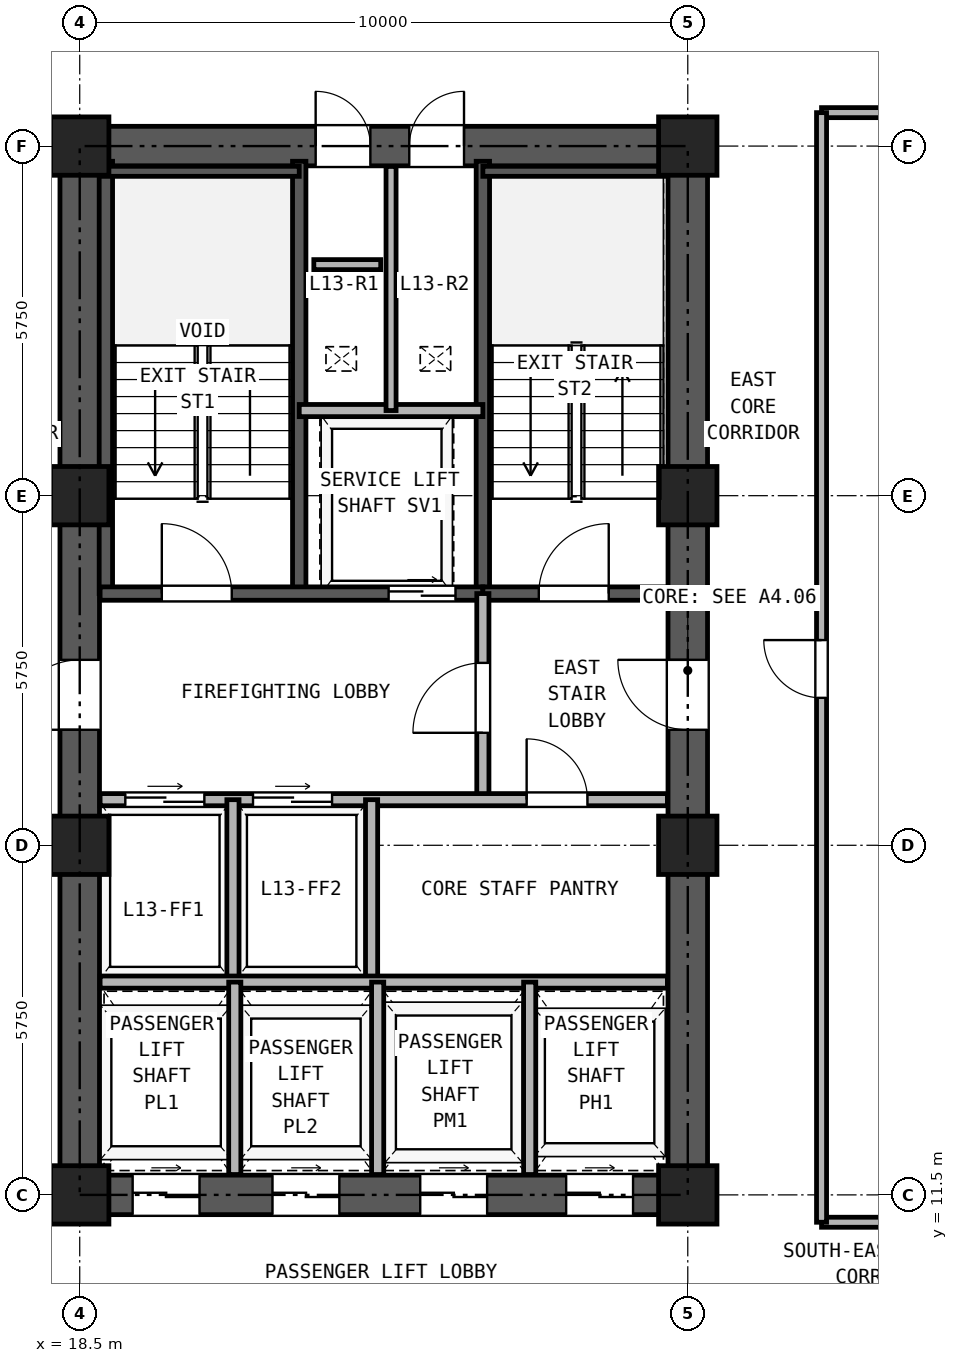
"""IFC4 building model, lengths in metres.
Left out: names, types, materials, properties, quantities, classifications, styles, units other than length and angle.
Written with IfcOpenShell. Run it as: python <this file> out.ifc"""

import sys

from ifc_helpers import new_model, si_unit, direction, frame, frame_2d, origin, origin_2d, place, context, subcontext, project, spatial, rectangle, hollow_rectangle, extrude, source, transform, mapped, element, fill, save


model = new_model("IFC4")
c1 = context("Model", 3, precision=1e-05, world=origin(), true_north=direction((0.0, 1.0)))
c2 = subcontext(c1, "Body", "Model", "MODEL_VIEW")
j1 = project(units=[si_unit("LENGTHUNIT", "METRE"), si_unit("PLANEANGLEUNIT", "RADIAN")], contexts=[c1])
p1 = place(None, origin())
s1 = spatial("IfcSite", under=j1, at=p1, CompositionType="ELEMENT")
p2 = place(p1, origin())
s2 = spatial("IfcBuilding", under=s1, at=p2, CompositionType="ELEMENT")
p3 = place(p2, frame((0.0, 0.0, 51.3)))
s3 = spatial("IfcBuildingStorey", under=s2, at=p3, CompositionType="ELEMENT", Elevation=51.3)
m1 = source(origin(), c2, "Body", "SweptSolid", [
    extrude(hollow_rectangle(XDim=0.96, YDim=0.96, WallThickness=0.06, at=origin_2d()), origin(), (0.0, 0.0, 1.0), 3.32),
])
for number, where, z_axis, x_axis in (
    (1, (18.5, 11.5, 0.0), (0.0, 0.0, 1.0), (1.0, 0.0, 0.0)),
    (2, (18.5, 17.25, 0.0), (0.0, 0.0, 1.0), (1.0, 0.0, 0.0)),
    (3, (18.5, 23.0, 0.0), (0.0, 0.0, 1.0), (1.0, 0.0, 0.0)),
    (4, (18.5, 28.75, 0.0), (0.0, 0.0, 1.0), (1.0, 0.0, 0.0)),
    (5, (28.5, 11.5, 0.0), (0.0, 0.0, 1.0), (1.0, 0.0, 0.0)),
    (6, (28.5, 17.25, 0.0), (0.0, 0.0, 1.0), (1.0, 0.0, 0.0)),
    (7, (28.5, 23.0, 0.0), (0.0, 0.0, 1.0), (1.0, 0.0, 0.0)),
    (8, (28.5, 28.75, 0.0), (0.0, 0.0, 1.0), (1.0, 0.0, 0.0)),
):
    element("IfcColumn", number, at=place(p3, frame(where, z_axis=z_axis, x_axis=x_axis)), inside=s3, PredefinedType="COLUMN", context=c2, shape_type="MappedRepresentation", body=[
        mapped(m1, transform((0.0, 0.0, 0.0), x_axis=(1.0, 0.0, 0.0), y_axis=(0.0, 1.0, 0.0), z_axis=(0.0, 0.0, 1.0), scale=1.0)),
    ])
p4 = place(p3, frame((18.175, 11.5, 0.0), z_axis=(0.0, 0.0, 1.0), x_axis=(1.0, 0.0, 0.0)))
e9 = element("IfcWall", 9, at=p4, inside=s3, PredefinedType="SHEAR", context=c2, shape_type="SweptSolid", body=[
    extrude(rectangle(XDim=10.65, YDim=0.65, at=frame_2d((5.325, 0.0))), origin(), (0.0, 0.0, 1.0), 3.32),
])
p5 = place(p4, frame((1.195, 0.0, 0.0)))
e10 = element("IfcOpeningElement", 10, at=p5, cuts=e9, PredefinedType="OPENING", context=c2, shape_type="SweptSolid", body=[
    extrude(rectangle(XDim=1.1, YDim=2.25, at=frame_2d((0.55, 1.125))), frame((0.0, 0.335, 0.0), z_axis=(0.0, -1.0, 0.0), x_axis=(1.0, 0.0, 0.0)), (0.0, 0.0, 1.0), 0.67),
])
p6 = place(p4, frame((3.495, 0.0, 0.0)))
e11 = element("IfcOpeningElement", 11, at=p6, cuts=e9, PredefinedType="OPENING", context=c2, shape_type="SweptSolid", body=[
    extrude(rectangle(XDim=1.1, YDim=2.25, at=frame_2d((0.55, 1.125))), frame((0.0, 0.335, 0.0), z_axis=(0.0, -1.0, 0.0), x_axis=(1.0, 0.0, 0.0)), (0.0, 0.0, 1.0), 0.67),
])
p7 = place(p4, frame((5.925, 0.0, 0.0)))
e12 = element("IfcOpeningElement", 12, at=p7, cuts=e9, PredefinedType="OPENING", context=c2, shape_type="SweptSolid", body=[
    extrude(rectangle(XDim=1.1, YDim=2.25, at=frame_2d((0.55, 1.125))), frame((0.0, 0.335, 0.0), z_axis=(0.0, -1.0, 0.0), x_axis=(1.0, 0.0, 0.0)), (0.0, 0.0, 1.0), 0.67),
])
p8 = place(p4, frame((8.325, 0.0, 0.0)))
e13 = element("IfcOpeningElement", 13, at=p8, cuts=e9, PredefinedType="OPENING", context=c2, shape_type="SweptSolid", body=[
    extrude(rectangle(XDim=1.1, YDim=2.25, at=frame_2d((0.55, 1.125))), frame((0.0, 0.335, 0.0), z_axis=(0.0, -1.0, 0.0), x_axis=(1.0, 0.0, 0.0)), (0.0, 0.0, 1.0), 0.67),
])
p9 = place(p3, frame((18.175, 28.75, 0.0), z_axis=(0.0, 0.0, 1.0), x_axis=(1.0, 0.0, 0.0)))
e14 = element("IfcWall", 14, at=p9, inside=s3, PredefinedType="SHEAR", context=c2, shape_type="SweptSolid", body=[
    extrude(rectangle(XDim=10.65, YDim=0.65, at=frame_2d((5.325, 0.0))), origin(), (0.0, 0.0, 1.0), 3.32),
])
p10 = place(p9, frame((4.205, 0.0, 0.0)))
e15 = element("IfcOpeningElement", 15, at=p10, cuts=e14, PredefinedType="OPENING", context=c2, shape_type="SweptSolid", body=[
    extrude(rectangle(XDim=0.9, YDim=2.05, at=frame_2d((0.45, 1.025))), frame((0.0, 0.335, 0.0), z_axis=(0.0, -1.0, 0.0), x_axis=(1.0, 0.0, 0.0)), (0.0, 0.0, 1.0), 0.67),
])
p11 = place(p9, frame((5.745, 0.0, 0.0)))
e16 = element("IfcOpeningElement", 16, at=p11, cuts=e14, PredefinedType="OPENING", context=c2, shape_type="SweptSolid", body=[
    extrude(rectangle(XDim=0.9, YDim=2.05, at=frame_2d((0.45, 1.025))), frame((0.0, 0.335, 0.0), z_axis=(0.0, -1.0, 0.0), x_axis=(1.0, 0.0, 0.0)), (0.0, 0.0, 1.0), 0.67),
])
p12 = place(p3, frame((18.5, 11.825, 0.0), z_axis=(0.0, 0.0, 1.0), x_axis=(0.0, 1.0, 0.0)))
e17 = element("IfcWall", 17, at=p12, inside=s3, PredefinedType="SHEAR", context=c2, shape_type="SweptSolid", body=[
    extrude(rectangle(XDim=16.6, YDim=0.65, at=frame_2d((8.3, 0.0))), origin(), (0.0, 0.0, 1.0), 3.32),
])
p13 = place(p12, frame((7.325, 0.0, 0.0)))
e18 = element("IfcOpeningElement", 18, at=p13, cuts=e17, PredefinedType="OPENING", context=c2, shape_type="SweptSolid", body=[
    extrude(rectangle(XDim=1.15, YDim=2.2, at=frame_2d((0.575, 1.1))), frame((0.0, 0.335, 0.0), z_axis=(0.0, -1.0, 0.0), x_axis=(1.0, 0.0, 0.0)), (0.0, 0.0, 1.0), 0.67),
])
p14 = place(p3, frame((28.5, 11.825, 0.0), z_axis=(0.0, 0.0, 1.0), x_axis=(0.0, 1.0, 0.0)))
e19 = element("IfcWall", 19, at=p14, inside=s3, PredefinedType="SHEAR", context=c2, shape_type="SweptSolid", body=[
    extrude(rectangle(XDim=16.6, YDim=0.65, at=frame_2d((8.3, 0.0))), origin(), (0.0, 0.0, 1.0), 3.32),
])
p15 = place(p14, frame((7.325, 0.0, 0.0)))
e20 = element("IfcOpeningElement", 20, at=p15, cuts=e19, PredefinedType="OPENING", context=c2, shape_type="SweptSolid", body=[
    extrude(rectangle(XDim=1.15, YDim=2.2, at=frame_2d((0.575, 1.1))), frame((0.0, 0.335, 0.0), z_axis=(0.0, -1.0, 0.0), x_axis=(1.0, 0.0, 0.0)), (0.0, 0.0, 1.0), 0.67),
])
for number, where, z_axis, x_axis in (
    (21, (18.93, 21.39, 0.0), (0.0, 0.0, 1.0), (0.0, 1.0, 0.0)),
    (22, (22.11, 21.39, 0.0), (0.0, 0.0, 1.0), (0.0, 1.0, 0.0)),
    (23, (25.13, 21.39, 0.0), (0.0, 0.0, 1.0), (0.0, 1.0, 0.0)),
):
    element("IfcWall", number, at=place(p3, frame(where, z_axis=z_axis, x_axis=x_axis)), inside=s3, PredefinedType="SOLIDWALL", context=c2, shape_type="SweptSolid", body=[
        extrude(rectangle(XDim=7.11, YDim=0.22, at=frame_2d((3.555, 0.0))), origin(), (0.0, 0.0, 1.0), 3.32),
    ])
p16 = place(p3, frame((18.835, 28.335, 0.0), z_axis=(0.0, 0.0, 1.0), x_axis=(1.0, 0.0, 0.0)))
e24 = element("IfcWall", 24, at=p16, inside=s3, PredefinedType="PARTITIONING", context=c2, shape_type="SweptSolid", body=[
    extrude(rectangle(XDim=3.275, YDim=0.165, at=frame_2d((1.638, 0.0))), origin(), (0.0, 0.0, 1.0), 3.32),
])
p17 = place(p3, frame((25.13, 28.335, 0.0), z_axis=(0.0, 0.0, 1.0), x_axis=(1.0, 0.0, 0.0)))
e25 = element("IfcWall", 25, at=p17, inside=s3, PredefinedType="PARTITIONING", context=c2, shape_type="SweptSolid", body=[
    extrude(rectangle(XDim=3.035, YDim=0.165, at=frame_2d((1.518, 0.0))), origin(), (0.0, 0.0, 1.0), 3.32),
])
p18 = place(p3, frame((18.835, 21.39, 0.0), z_axis=(0.0, 0.0, 1.0), x_axis=(1.0, 0.0, 0.0)))
e26 = element("IfcWall", 26, at=p18, inside=s3, PredefinedType="SOLIDWALL", context=c2, shape_type="SweptSolid", body=[
    extrude(rectangle(XDim=6.295, YDim=0.22, at=frame_2d((3.147, 0.0))), origin(), (0.0, 0.0, 1.0), 3.32),
])
p19 = place(p18, frame((1.015, 0.0, 0.0)))
e27 = element("IfcOpeningElement", 27, at=p19, cuts=e26, PredefinedType="OPENING", context=c2, shape_type="SweptSolid", body=[
    extrude(rectangle(XDim=1.15, YDim=2.2, at=frame_2d((0.575, 1.1))), frame((0.0, 0.12, 0.0), z_axis=(0.0, -1.0, 0.0), x_axis=(1.0, 0.0, 0.0)), (0.0, 0.0, 1.0), 0.24),
])
p20 = place(p18, frame((4.745, 0.0, 0.0)))
e28 = element("IfcOpeningElement", 28, at=p20, cuts=e26, PredefinedType="OPENING", context=c2, shape_type="SweptSolid", body=[
    extrude(rectangle(XDim=1.1, YDim=2.25, at=frame_2d((0.55, 1.125))), frame((0.0, 0.12, 0.0), z_axis=(0.0, -1.0, 0.0), x_axis=(1.0, 0.0, 0.0)), (0.0, 0.0, 1.0), 0.24),
])
p21 = place(p3, frame((25.13, 21.39, 0.0), z_axis=(0.0, 0.0, 1.0), x_axis=(1.0, 0.0, 0.0)))
e29 = element("IfcWall", 29, at=p21, inside=s3, PredefinedType="SOLIDWALL", context=c2, shape_type="SweptSolid", body=[
    extrude(rectangle(XDim=3.035, YDim=0.22, at=frame_2d((1.518, 0.0))), origin(), (0.0, 0.0, 1.0), 3.32),
])
p22 = place(p21, frame((0.92, 0.0, 0.0)))
e30 = element("IfcOpeningElement", 30, at=p22, cuts=e29, PredefinedType="OPENING", context=c2, shape_type="SweptSolid", body=[
    extrude(rectangle(XDim=1.15, YDim=2.2, at=frame_2d((0.575, 1.1))), frame((0.0, 0.12, 0.0), z_axis=(0.0, -1.0, 0.0), x_axis=(1.0, 0.0, 0.0)), (0.0, 0.0, 1.0), 0.24),
])
p23 = place(p3, frame((22.11, 24.4, 0.0), z_axis=(0.0, 0.0, 1.0), x_axis=(1.0, 0.0, 0.0)))
e31 = element("IfcWall", 31, at=p23, inside=s3, PredefinedType="PARTITIONING", context=c2, shape_type="SweptSolid", body=[
    extrude(rectangle(XDim=3.02, YDim=0.2, at=frame_2d((1.51, 0.0))), origin(), (0.0, 0.0, 1.0), 3.32),
])
p24 = place(p3, frame((23.62, 24.4, 0.0), z_axis=(0.0, 0.0, 1.0), x_axis=(0.0, 1.0, 0.0)))
e32 = element("IfcWall", 32, at=p24, inside=s3, PredefinedType="PARTITIONING", context=c2, shape_type="SweptSolid", body=[
    extrude(rectangle(XDim=4.015, YDim=0.165, at=frame_2d((2.008, 0.0))), origin(), (0.0, 0.0, 1.0), 3.32),
])
p25 = place(p3, frame((25.13, 18.0, 0.0), z_axis=(0.0, 0.0, 1.0), x_axis=(0.0, 1.0, 0.0)))
e33 = element("IfcWall", 33, at=p25, inside=s3, PredefinedType="PARTITIONING", context=c2, shape_type="SweptSolid", body=[
    extrude(rectangle(XDim=3.39, YDim=0.2, at=frame_2d((1.695, 0.0))), origin(), (0.0, 0.0, 1.0), 3.32),
])
p26 = place(p25, frame((1.1, 0.0, 0.0)))
e34 = element("IfcOpeningElement", 34, at=p26, cuts=e33, PredefinedType="OPENING", context=c2, shape_type="SweptSolid", body=[
    extrude(rectangle(XDim=1.15, YDim=2.2, at=frame_2d((0.575, 1.1))), frame((0.0, 0.11, 0.0), z_axis=(0.0, -1.0, 0.0), x_axis=(1.0, 0.0, 0.0)), (0.0, 0.0, 1.0), 0.22),
])
p27 = place(p3, frame((18.835, 18.0, 0.0), z_axis=(0.0, 0.0, 1.0), x_axis=(1.0, 0.0, 0.0)))
e35 = element("IfcWall", 35, at=p27, inside=s3, PredefinedType="PARTITIONING", context=c2, shape_type="SweptSolid", body=[
    extrude(rectangle(XDim=9.33, YDim=0.2, at=frame_2d((4.665, 0.0))), origin(), (0.0, 0.0, 1.0), 3.32),
])
p28 = place(p27, frame((0.415, 0.0, 0.0)))
e36 = element("IfcOpeningElement", 36, at=p28, cuts=e35, PredefinedType="OPENING", context=c2, shape_type="SweptSolid", body=[
    extrude(rectangle(XDim=1.3, YDim=2.3, at=frame_2d((0.65, 1.15))), frame((0.0, 0.11, 0.0), z_axis=(0.0, -1.0, 0.0), x_axis=(1.0, 0.0, 0.0)), (0.0, 0.0, 1.0), 0.22),
])
p29 = place(p27, frame((2.515, 0.0, 0.0)))
e37 = element("IfcOpeningElement", 37, at=p29, cuts=e35, PredefinedType="OPENING", context=c2, shape_type="SweptSolid", body=[
    extrude(rectangle(XDim=1.3, YDim=2.3, at=frame_2d((0.65, 1.15))), frame((0.0, 0.11, 0.0), z_axis=(0.0, -1.0, 0.0), x_axis=(1.0, 0.0, 0.0)), (0.0, 0.0, 1.0), 0.22),
])
p30 = place(p27, frame((7.015, 0.0, 0.0)))
e38 = element("IfcOpeningElement", 38, at=p30, cuts=e35, PredefinedType="OPENING", context=c2, shape_type="SweptSolid", body=[
    extrude(rectangle(XDim=1.0, YDim=2.15, at=frame_2d((0.5, 1.075))), frame((0.0, 0.11, 0.0), z_axis=(0.0, -1.0, 0.0), x_axis=(1.0, 0.0, 0.0)), (0.0, 0.0, 1.0), 0.22),
])
for number, where, z_axis, x_axis in (
    (39, (21.02, 15.0, 0.0), (0.0, 0.0, 1.0), (0.0, 1.0, 0.0)),
    (40, (23.3, 15.0, 0.0), (0.0, 0.0, 1.0), (0.0, 1.0, 0.0)),
):
    element("IfcWall", number, at=place(p3, frame(where, z_axis=z_axis, x_axis=x_axis)), inside=s3, PredefinedType="PARTITIONING", context=c2, shape_type="SweptSolid", body=[
        extrude(rectangle(XDim=3.0, YDim=0.2, at=frame_2d((1.5, 0.0))), origin(), (0.0, 0.0, 1.0), 3.32),
    ])
p31 = place(p3, frame((18.835, 15.0, 0.0), z_axis=(0.0, 0.0, 1.0), x_axis=(1.0, 0.0, 0.0)))
e41 = element("IfcWall", 41, at=p31, inside=s3, PredefinedType="PARTITIONING", context=c2, shape_type="SweptSolid", body=[
    extrude(rectangle(XDim=9.33, YDim=0.2, at=frame_2d((4.665, 0.0))), origin(), (0.0, 0.0, 1.0), 3.32),
])
for number, where, z_axis, x_axis in (
    (42, (21.05, 11.835, 0.0), (0.0, 0.0, 1.0), (0.0, 1.0, 0.0)),
    (43, (23.4, 11.835, 0.0), (0.0, 0.0, 1.0), (0.0, 1.0, 0.0)),
    (44, (25.9, 11.835, 0.0), (0.0, 0.0, 1.0), (0.0, 1.0, 0.0)),
):
    element("IfcWall", number, at=place(p3, frame(where, z_axis=z_axis, x_axis=x_axis)), inside=s3, PredefinedType="PARTITIONING", context=c2, shape_type="SweptSolid", body=[
        extrude(rectangle(XDim=3.165, YDim=0.2, at=frame_2d((1.583, 0.0))), origin(), (0.0, 0.0, 1.0), 3.32),
    ])
for number, where, z_axis, x_axis in (
    (45, (30.7, 11.05, 0.0), (0.0, 0.0, 1.0), (1.0, 0.0, 0.0)),
    (46, (30.7, 29.3, 0.0), (0.0, 0.0, 1.0), (1.0, 0.0, 0.0)),
):
    element("IfcWall", number, at=place(p3, frame(where, z_axis=z_axis, x_axis=x_axis)), inside=s3, PredefinedType="PARTITIONING", context=c2, shape_type="SweptSolid", body=[
        extrude(rectangle(XDim=7.3, YDim=0.165, at=frame_2d((3.65, 0.0))), origin(), (0.0, 0.0, 1.0), 3.32),
    ])
p32 = place(p3, frame((30.7, 11.05, 0.0), z_axis=(0.0, 0.0, 1.0), x_axis=(0.0, 1.0, 0.0)))
e47 = element("IfcWall", 47, at=p32, inside=s3, PredefinedType="PARTITIONING", context=c2, shape_type="SweptSolid", body=[
    extrude(rectangle(XDim=18.25, YDim=0.165, at=frame_2d((9.125, 0.0))), origin(), (0.0, 0.0, 1.0), 3.32),
])
p33 = place(p32, frame((8.625, 0.0, 0.0)))
e48 = element("IfcOpeningElement", 48, at=p33, cuts=e47, PredefinedType="OPENING", context=c2, shape_type="SweptSolid", body=[
    extrude(rectangle(XDim=0.95, YDim=2.15, at=frame_2d((0.475, 1.075))), frame((0.0, 0.093, 0.0), z_axis=(0.0, -1.0, 0.0), x_axis=(1.0, 0.0, 0.0)), (0.0, 0.0, 1.0), 0.185),
])
p34 = place(p3, frame((22.35, 26.8, 0.0), z_axis=(0.0, 0.0, 1.0), x_axis=(1.0, 0.0, 0.0)))
e49 = element("IfcWall", 49, at=p34, inside=s3, PredefinedType="PARTITIONING", context=c2, shape_type="SweptSolid", body=[
    extrude(rectangle(XDim=1.1, YDim=0.165, at=frame_2d((0.55, 0.0))), origin(), (0.0, 0.0, 1.0), 3.32),
])
p35 = place(p19, frame((1.15, 0.0, 0.0), z_axis=(0.0, 0.0, 1.0), x_axis=(-1.0, 0.0, 0.0)))
e50 = element("IfcDoor", 50, at=p35, inside=s3, OperationType="SINGLE_SWING_LEFT", PredefinedType="DOOR", context=c2, shape_type="SweptSolid", body=[
    extrude(rectangle(XDim=1.15, YDim=2.2, at=frame_2d((0.575, 1.1))), frame((0.0, 0.025, 0.0), z_axis=(0.0, -1.0, 0.0), x_axis=(1.0, 0.0, 0.0)), (0.0, 0.0, 1.0), 0.05),
])
fill(e27, e50)
p36 = place(p22, frame((1.15, 0.0, 0.0), z_axis=(0.0, 0.0, 1.0), x_axis=(-1.0, 0.0, 0.0)))
e51 = element("IfcDoor", 51, at=p36, inside=s3, OperationType="SINGLE_SWING_RIGHT", PredefinedType="DOOR", context=c2, shape_type="SweptSolid", body=[
    extrude(rectangle(XDim=1.15, YDim=2.2, at=frame_2d((0.575, 1.1))), frame((0.0, 0.025, 0.0), z_axis=(0.0, -1.0, 0.0), x_axis=(1.0, 0.0, 0.0)), (0.0, 0.0, 1.0), 0.05),
])
fill(e30, e51)
p37 = place(p20, frame((1.1, 0.0, 0.0), z_axis=(0.0, 0.0, 1.0), x_axis=(-1.0, 0.0, 0.0)))
e52 = element("IfcDoor", 52, at=p37, inside=s3, OperationType="DOUBLE_DOOR_SLIDING", PredefinedType="DOOR", context=c2, shape_type="SweptSolid", body=[
    extrude(rectangle(XDim=1.1, YDim=2.25, at=frame_2d((0.55, 1.125))), frame((0.0, 0.025, 0.0), z_axis=(0.0, -1.0, 0.0), x_axis=(1.0, 0.0, 0.0)), (0.0, 0.0, 1.0), 0.05),
])
fill(e28, e52)
p38 = place(p26, origin())
e53 = element("IfcDoor", 53, at=p38, inside=s3, OperationType="SINGLE_SWING_LEFT", PredefinedType="DOOR", context=c2, shape_type="SweptSolid", body=[
    extrude(rectangle(XDim=1.15, YDim=2.2, at=frame_2d((0.575, 1.1))), frame((0.0, 0.025, 0.0), z_axis=(0.0, -1.0, 0.0), x_axis=(1.0, 0.0, 0.0)), (0.0, 0.0, 1.0), 0.05),
])
fill(e34, e53)
p39 = place(p28, origin())
e54 = element("IfcDoor", 54, at=p39, inside=s3, OperationType="DOUBLE_DOOR_SLIDING", PredefinedType="DOOR", context=c2, shape_type="SweptSolid", body=[
    extrude(rectangle(XDim=1.3, YDim=2.3, at=frame_2d((0.65, 1.15))), frame((0.0, 0.025, 0.0), z_axis=(0.0, -1.0, 0.0), x_axis=(1.0, 0.0, 0.0)), (0.0, 0.0, 1.0), 0.05),
])
fill(e36, e54)
p40 = place(p29, origin())
e55 = element("IfcDoor", 55, at=p40, inside=s3, OperationType="DOUBLE_DOOR_SLIDING", PredefinedType="DOOR", context=c2, shape_type="SweptSolid", body=[
    extrude(rectangle(XDim=1.3, YDim=2.3, at=frame_2d((0.65, 1.15))), frame((0.0, 0.025, 0.0), z_axis=(0.0, -1.0, 0.0), x_axis=(1.0, 0.0, 0.0)), (0.0, 0.0, 1.0), 0.05),
])
fill(e37, e55)
p41 = place(p30, frame((1.0, 0.0, 0.0), z_axis=(0.0, 0.0, 1.0), x_axis=(-1.0, 0.0, 0.0)))
e56 = element("IfcDoor", 56, at=p41, inside=s3, OperationType="SINGLE_SWING_LEFT", PredefinedType="DOOR", context=c2, shape_type="SweptSolid", body=[
    extrude(rectangle(XDim=1.0, YDim=2.15, at=frame_2d((0.5, 1.075))), frame((0.0, 0.025, 0.0), z_axis=(0.0, -1.0, 0.0), x_axis=(1.0, 0.0, 0.0)), (0.0, 0.0, 1.0), 0.05),
])
fill(e38, e56)
p42 = place(p13, frame((1.15, 0.0, 0.0), z_axis=(0.0, 0.0, 1.0), x_axis=(-1.0, 0.0, 0.0)))
e57 = element("IfcDoor", 57, at=p42, inside=s3, OperationType="SINGLE_SWING_LEFT", PredefinedType="DOOR", context=c2, shape_type="SweptSolid", body=[
    extrude(rectangle(XDim=1.15, YDim=2.2, at=frame_2d((0.575, 1.1))), frame((0.0, 0.025, 0.0), z_axis=(0.0, -1.0, 0.0), x_axis=(1.0, 0.0, 0.0)), (0.0, 0.0, 1.0), 0.05),
])
fill(e18, e57)
p43 = place(p15, origin())
e58 = element("IfcDoor", 58, at=p43, inside=s3, OperationType="SINGLE_SWING_RIGHT", PredefinedType="DOOR", context=c2, shape_type="SweptSolid", body=[
    extrude(rectangle(XDim=1.15, YDim=2.2, at=frame_2d((0.575, 1.1))), frame((0.0, 0.025, 0.0), z_axis=(0.0, -1.0, 0.0), x_axis=(1.0, 0.0, 0.0)), (0.0, 0.0, 1.0), 0.05),
])
fill(e20, e58)
p44 = place(p10, origin())
e59 = element("IfcDoor", 59, at=p44, inside=s3, OperationType="SINGLE_SWING_LEFT", PredefinedType="DOOR", context=c2, shape_type="SweptSolid", body=[
    extrude(rectangle(XDim=0.9, YDim=2.05, at=frame_2d((0.45, 1.025))), frame((0.0, 0.025, 0.0), z_axis=(0.0, -1.0, 0.0), x_axis=(1.0, 0.0, 0.0)), (0.0, 0.0, 1.0), 0.05),
])
fill(e15, e59)
p45 = place(p11, origin())
e60 = element("IfcDoor", 60, at=p45, inside=s3, OperationType="SINGLE_SWING_RIGHT", PredefinedType="DOOR", context=c2, shape_type="SweptSolid", body=[
    extrude(rectangle(XDim=0.9, YDim=2.05, at=frame_2d((0.45, 1.025))), frame((0.0, 0.025, 0.0), z_axis=(0.0, -1.0, 0.0), x_axis=(1.0, 0.0, 0.0)), (0.0, 0.0, 1.0), 0.05),
])
fill(e16, e60)
p46 = place(p5, frame((1.1, 0.0, 0.0), z_axis=(0.0, 0.0, 1.0), x_axis=(-1.0, 0.0, 0.0)))
e61 = element("IfcDoor", 61, at=p46, inside=s3, OperationType="DOUBLE_DOOR_SLIDING", PredefinedType="DOOR", context=c2, shape_type="SweptSolid", body=[
    extrude(rectangle(XDim=1.1, YDim=2.25, at=frame_2d((0.55, 1.125))), frame((0.0, 0.025, 0.0), z_axis=(0.0, -1.0, 0.0), x_axis=(1.0, 0.0, 0.0)), (0.0, 0.0, 1.0), 0.05),
])
fill(e10, e61)
p47 = place(p6, frame((1.1, 0.0, 0.0), z_axis=(0.0, 0.0, 1.0), x_axis=(-1.0, 0.0, 0.0)))
e62 = element("IfcDoor", 62, at=p47, inside=s3, OperationType="DOUBLE_DOOR_SLIDING", PredefinedType="DOOR", context=c2, shape_type="SweptSolid", body=[
    extrude(rectangle(XDim=1.1, YDim=2.25, at=frame_2d((0.55, 1.125))), frame((0.0, 0.025, 0.0), z_axis=(0.0, -1.0, 0.0), x_axis=(1.0, 0.0, 0.0)), (0.0, 0.0, 1.0), 0.05),
])
fill(e11, e62)
p48 = place(p7, frame((1.1, 0.0, 0.0), z_axis=(0.0, 0.0, 1.0), x_axis=(-1.0, 0.0, 0.0)))
e63 = element("IfcDoor", 63, at=p48, inside=s3, OperationType="DOUBLE_DOOR_SLIDING", PredefinedType="DOOR", context=c2, shape_type="SweptSolid", body=[
    extrude(rectangle(XDim=1.1, YDim=2.25, at=frame_2d((0.55, 1.125))), frame((0.0, 0.025, 0.0), z_axis=(0.0, -1.0, 0.0), x_axis=(1.0, 0.0, 0.0)), (0.0, 0.0, 1.0), 0.05),
])
fill(e12, e63)
p49 = place(p8, frame((1.1, 0.0, 0.0), z_axis=(0.0, 0.0, 1.0), x_axis=(-1.0, 0.0, 0.0)))
e64 = element("IfcDoor", 64, at=p49, inside=s3, OperationType="DOUBLE_DOOR_SLIDING", PredefinedType="DOOR", context=c2, shape_type="SweptSolid", body=[
    extrude(rectangle(XDim=1.1, YDim=2.25, at=frame_2d((0.55, 1.125))), frame((0.0, 0.025, 0.0), z_axis=(0.0, -1.0, 0.0), x_axis=(1.0, 0.0, 0.0)), (0.0, 0.0, 1.0), 0.05),
])
fill(e13, e64)
p50 = place(p33, origin())
e65 = element("IfcDoor", 65, at=p50, inside=s3, OperationType="SINGLE_SWING_RIGHT", PredefinedType="DOOR", context=c2, shape_type="SweptSolid", body=[
    extrude(rectangle(XDim=0.95, YDim=2.15, at=frame_2d((0.475, 1.075))), frame((0.0, 0.025, 0.0), z_axis=(0.0, -1.0, 0.0), x_axis=(1.0, 0.0, 0.0)), (0.0, 0.0, 1.0), 0.05),
])
fill(e48, e65)
save(model, sys.argv[1])
